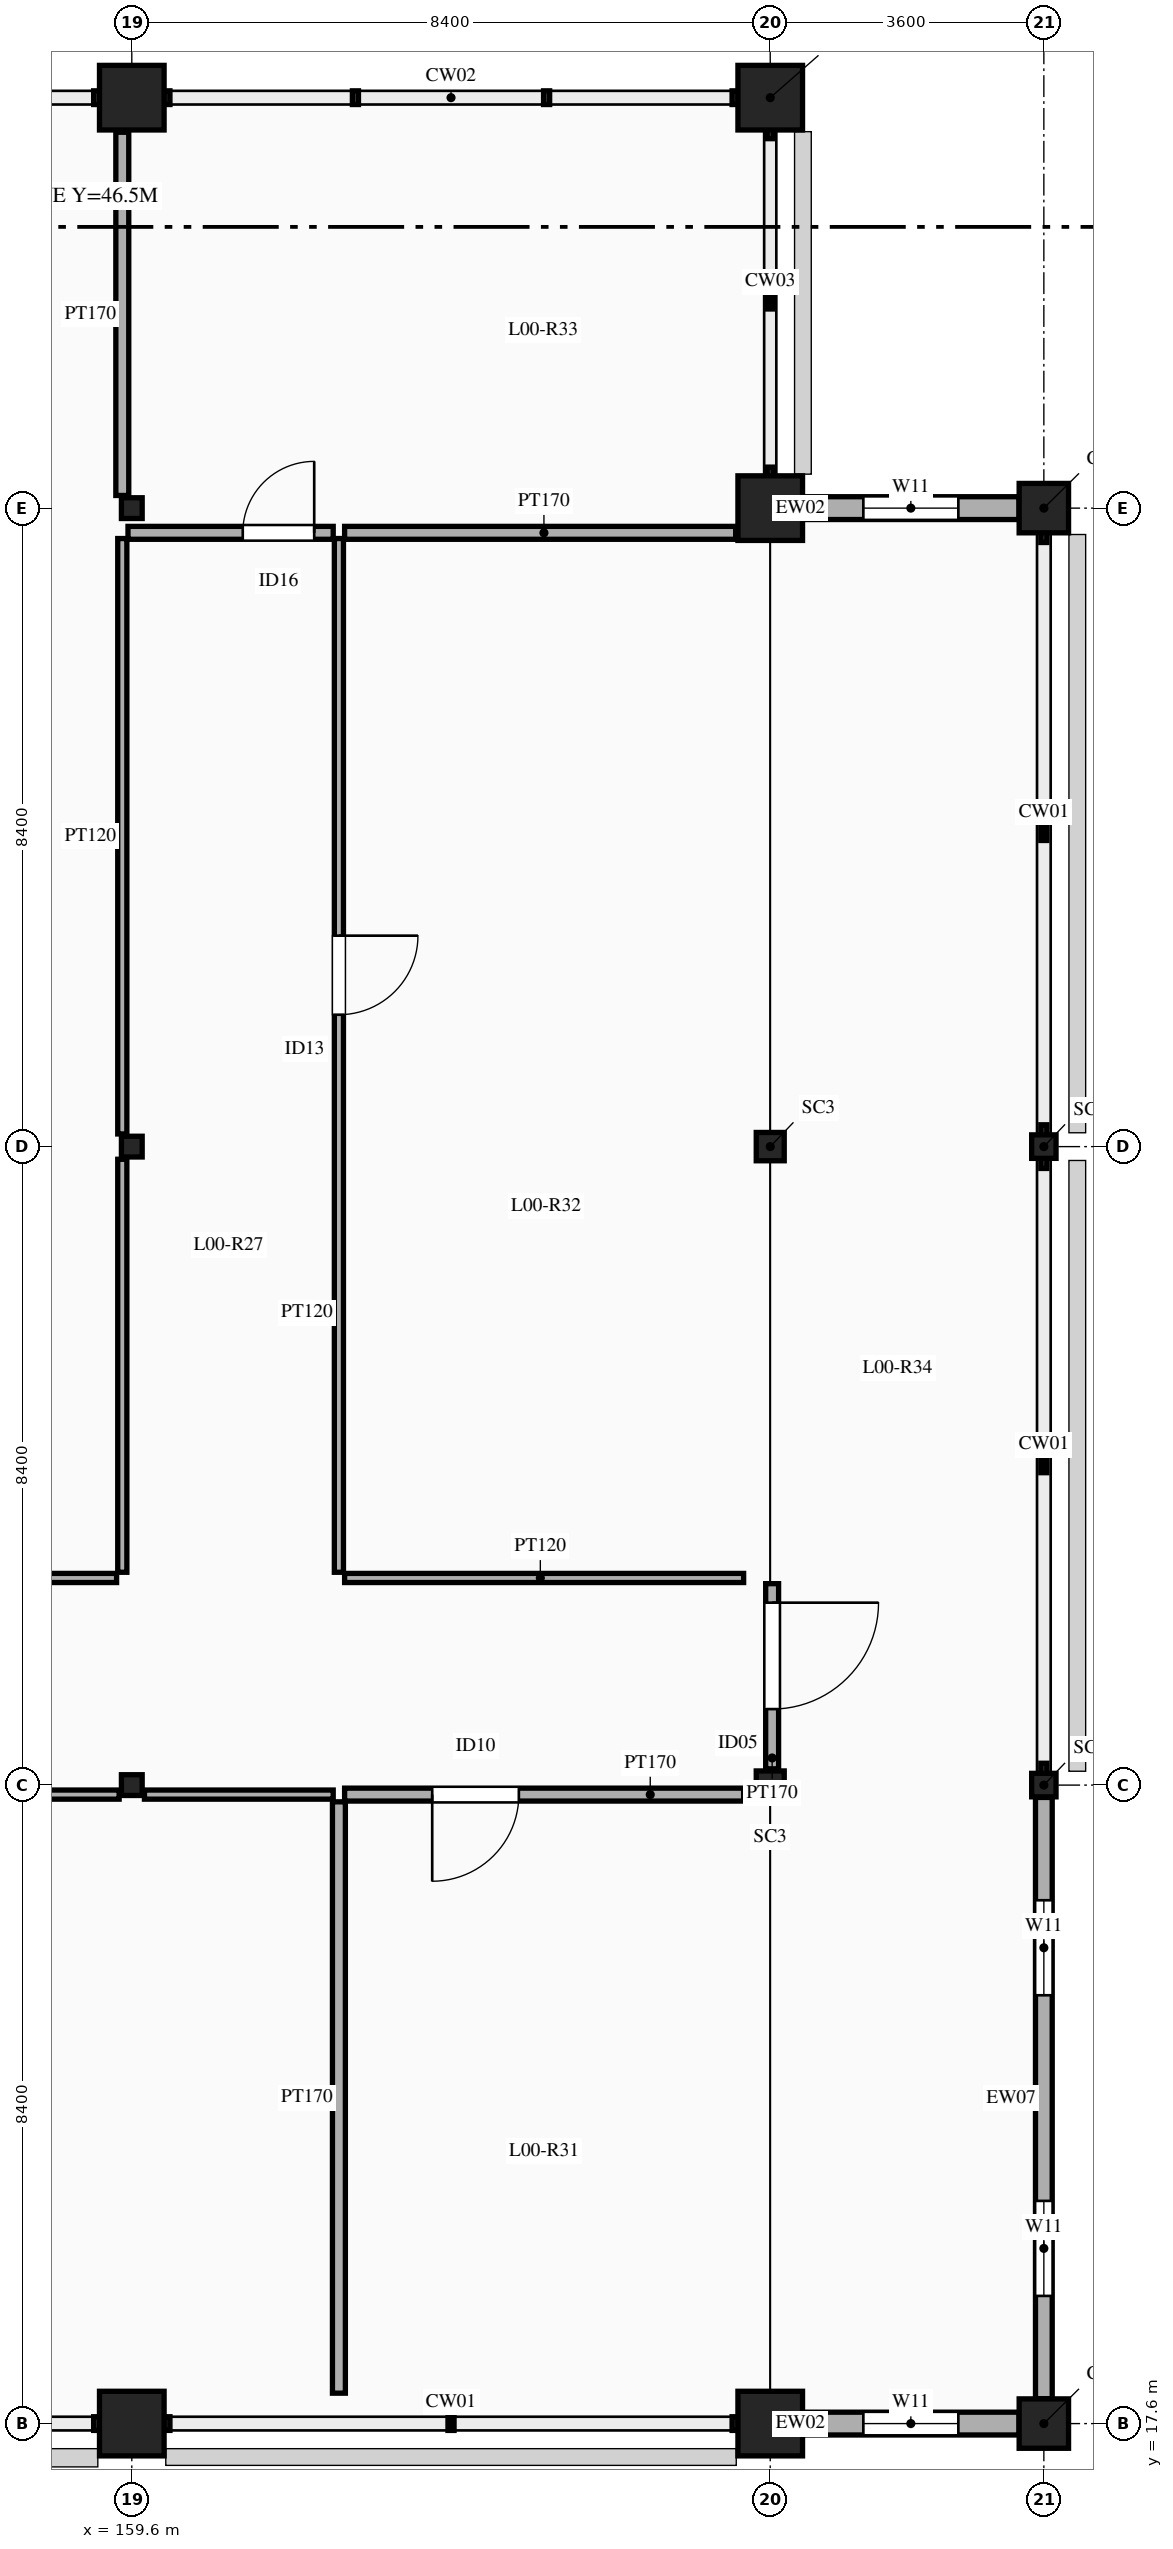
"""IFC4 building model, lengths in metres.
Left out: names, types, materials, properties, quantities, classifications, styles, units other than length and angle.
Written with IfcOpenShell. Run it as: python <this file> out.ifc"""

import sys

from ifc_helpers import new_model, si_unit, direction, frame, frame_2d, origin, origin_2d, place, context, subcontext, project, spatial, rectangle, hollow_circle, i_section, extrude, element, fill, save


model = new_model("IFC4")
c1 = context("Model", 3, precision=1e-05, world=origin(), true_north=direction((0.0, 1.0)))
c2 = subcontext(c1, "Body", "Model", "MODEL_VIEW")
j1 = project(units=[si_unit("LENGTHUNIT", "METRE"), si_unit("PLANEANGLEUNIT", "RADIAN")], contexts=[c1])
p1 = place(None, origin())
s1 = spatial("IfcSite", under=j1, at=p1, CompositionType="ELEMENT")
p2 = place(p1, origin())
s2 = spatial("IfcBuilding", under=s1, at=p2, CompositionType="ELEMENT")
p3 = place(p2, origin())
s3 = spatial("IfcBuildingStorey", under=s2, at=p3, CompositionType="ELEMENT", Elevation=0.0)
for number, where, z_axis, x_axis in (
    (1, (159.6, 17.6, 0.0), (0.0, 0.0, 1.0), (1.0, 0.0, 0.0)),
    (2, (159.6, 48.2, 0.0), (0.0, 0.0, 1.0), (1.0, 0.0, 0.0)),
    (3, (168.0, 17.6, 0.0), (0.0, 0.0, 1.0), (1.0, 0.0, 0.0)),
):
    element("IfcColumn", number, at=place(p3, frame(where, z_axis=z_axis, x_axis=x_axis)), inside=s3, PredefinedType="COLUMN", context=c2, shape_type="SweptSolid", body=[
        extrude(rectangle(XDim=0.85, YDim=0.85, at=origin_2d()), origin(), (0.0, 0.0, 1.0), 5.4),
    ])
for number, where, z_axis, x_axis in (
    (4, (168.0, 26.0, 0.0), (0.0, 0.0, 1.0), (1.0, 0.0, 0.0)),
    (5, (168.0, 34.4, 0.0), (0.0, 0.0, 1.0), (1.0, 0.0, 0.0)),
):
    element("IfcColumn", number, at=place(p3, frame(where, z_axis=z_axis, x_axis=x_axis)), inside=s3, PredefinedType="COLUMN", context=c2, shape_type="SweptSolid", body=[
        extrude(i_section(OverallWidth=0.373, OverallDepth=0.368, WebThickness=0.014, FlangeThickness=0.024, FilletRadius=0.015, at=origin_2d()), origin(), (0.0, 0.0, 1.0), 5.4),
    ])
for number, where, z_axis, x_axis in (
    (6, (168.0, 42.8, 0.0), (0.0, 0.0, 1.0), (1.0, 0.0, 0.0)),
    (7, (168.0, 48.2, 0.0), (0.0, 0.0, 1.0), (1.0, 0.0, 0.0)),
):
    element("IfcColumn", number, at=place(p3, frame(where, z_axis=z_axis, x_axis=x_axis)), inside=s3, PredefinedType="COLUMN", context=c2, shape_type="SweptSolid", body=[
        extrude(rectangle(XDim=0.85, YDim=0.85, at=origin_2d()), origin(), (0.0, 0.0, 1.0), 5.4),
    ])
p4 = place(p3, frame((171.6, 17.6, 0.0), z_axis=(0.0, 0.0, 1.0), x_axis=(1.0, 0.0, 0.0)))
e8 = element("IfcColumn", 8, at=p4, inside=s3, PredefinedType="COLUMN", context=c2, shape_type="SweptSolid", body=[
    extrude(rectangle(XDim=0.65, YDim=0.65, at=origin_2d()), origin(), (0.0, 0.0, 1.0), 5.4),
])
for number, where, z_axis, x_axis in (
    (9, (171.6, 26.0, 0.0), (0.0, 0.0, 1.0), (1.0, 0.0, 0.0)),
    (10, (171.6, 34.4, 0.0), (0.0, 0.0, 1.0), (1.0, 0.0, 0.0)),
):
    element("IfcColumn", number, at=place(p3, frame(where, z_axis=z_axis, x_axis=x_axis)), inside=s3, PredefinedType="COLUMN", context=c2, shape_type="SweptSolid", body=[
        extrude(i_section(OverallWidth=0.309, OverallDepth=0.321, WebThickness=0.014, FlangeThickness=0.022, FilletRadius=0.015, at=origin_2d()), origin(), (0.0, 0.0, 1.0), 5.4),
    ])
p5 = place(p3, frame((171.6, 42.8, 0.0), z_axis=(0.0, 0.0, 1.0), x_axis=(1.0, 0.0, 0.0)))
e11 = element("IfcColumn", 11, at=p5, inside=s3, PredefinedType="COLUMN", context=c2, shape_type="SweptSolid", body=[
    extrude(rectangle(XDim=0.65, YDim=0.65, at=origin_2d()), origin(), (0.0, 0.0, 1.0), 5.4),
])
for number, where, z_axis, x_axis in (
    (12, (159.6, 26.0, 0.0), (0.0, 0.0, 1.0), (1.0, 0.0, 0.0)),
    (13, (159.6, 34.4, 0.0), (0.0, 0.0, 1.0), (1.0, 0.0, 0.0)),
    (14, (159.6, 42.8, 0.0), (0.0, 0.0, 1.0), (1.0, 0.0, 0.0)),
):
    element("IfcColumn", number, at=place(p3, frame(where, z_axis=z_axis, x_axis=x_axis)), inside=s3, PredefinedType="COLUMN", context=c2, shape_type="SweptSolid", body=[
        extrude(hollow_circle(Radius=0.136, WallThickness=0.01, at=origin_2d()), origin(), (0.0, 0.0, 1.0), 5.2),
    ])
p6 = place(p3, frame((168.427, 17.6, 0.0), z_axis=(0.0, 0.0, 1.0), x_axis=(1.0, 0.0, 0.0)))
e15 = element("IfcWall", 15, at=p6, inside=s3, PredefinedType="SOLIDWALL", context=c2, shape_type="SweptSolid", body=[
    extrude(rectangle(XDim=2.846, YDim=0.3, at=frame_2d((1.423, 0.0))), origin(), (0.0, 0.0, 1.0), 4.45),
])
p7 = place(p6, frame((0.798, 0.0, 0.9)))
e16 = element("IfcOpeningElement", 16, at=p7, cuts=e15, PredefinedType="OPENING", context=c2, shape_type="SweptSolid", body=[
    extrude(rectangle(XDim=1.25, YDim=1.8, at=frame_2d((0.625, 0.9))), frame((0.0, 0.16, 0.0), z_axis=(0.0, -1.0, 0.0), x_axis=(1.0, 0.0, 0.0)), (0.0, 0.0, 1.0), 0.32),
])
p8 = place(p3, frame((168.427, 42.8, 0.0), z_axis=(0.0, 0.0, 1.0), x_axis=(1.0, 0.0, 0.0)))
e17 = element("IfcWall", 17, at=p8, inside=s3, PredefinedType="SOLIDWALL", context=c2, shape_type="SweptSolid", body=[
    extrude(rectangle(XDim=2.846, YDim=0.3, at=frame_2d((1.423, 0.0))), origin(), (0.0, 0.0, 1.0), 4.45),
])
p9 = place(p8, frame((0.798, 0.0, 0.9)))
e18 = element("IfcOpeningElement", 18, at=p9, cuts=e17, PredefinedType="OPENING", context=c2, shape_type="SweptSolid", body=[
    extrude(rectangle(XDim=1.25, YDim=1.8, at=frame_2d((0.625, 0.9))), frame((0.0, 0.16, 0.0), z_axis=(0.0, -1.0, 0.0), x_axis=(1.0, 0.0, 0.0)), (0.0, 0.0, 1.0), 0.32),
])
p10 = place(p3, frame((171.6, 17.927, 0.0), z_axis=(0.0, 0.0, 1.0), x_axis=(0.0, 1.0, 0.0)))
e19 = element("IfcWall", 19, at=p10, inside=s3, PredefinedType="USERDEFINED", context=c2, shape_type="SweptSolid", body=[
    extrude(rectangle(XDim=7.911, YDim=0.22, at=frame_2d((3.955, 0.0))), origin(), (0.0, 0.0, 1.0), 4.45),
])
p11 = place(p10, frame((1.353, 0.0, 0.9)))
e20 = element("IfcOpeningElement", 20, at=p11, cuts=e19, PredefinedType="OPENING", context=c2, shape_type="SweptSolid", body=[
    extrude(rectangle(XDim=1.25, YDim=1.8, at=frame_2d((0.625, 0.9))), frame((0.0, 0.12, 0.0), z_axis=(0.0, -1.0, 0.0), x_axis=(1.0, 0.0, 0.0)), (0.0, 0.0, 1.0), 0.24),
])
p12 = place(p10, frame((5.308, 0.0, 0.9)))
e21 = element("IfcOpeningElement", 21, at=p12, cuts=e19, PredefinedType="OPENING", context=c2, shape_type="SweptSolid", body=[
    extrude(rectangle(XDim=1.25, YDim=1.8, at=frame_2d((0.625, 0.9))), frame((0.0, 0.12, 0.0), z_axis=(0.0, -1.0, 0.0), x_axis=(1.0, 0.0, 0.0)), (0.0, 0.0, 1.0), 0.24),
])
p13 = place(p3, frame((151.366, 25.875, 0.0), z_axis=(0.0, 0.0, 1.0), x_axis=(1.0, 0.0, 0.0)))
e22 = element("IfcWall", 22, at=p13, inside=s3, PredefinedType="PARTITIONING", context=c2, shape_type="SweptSolid", body=[
    extrude(rectangle(XDim=8.067, YDim=0.12, at=frame_2d((4.034, 0.0))), origin(), (0.0, 0.0, 1.0), 4.35),
])
p14 = place(p3, frame((159.767, 25.875, 0.0), z_axis=(0.0, 0.0, 1.0), x_axis=(1.0, 0.0, 0.0)))
e23 = element("IfcWall", 23, at=p14, inside=s3, PredefinedType="PARTITIONING", context=c2, shape_type="SweptSolid", body=[
    extrude(rectangle(XDim=2.483, YDim=0.12, at=frame_2d((1.242, 0.0))), origin(), (0.0, 0.0, 1.0), 4.35),
])
p15 = place(p3, frame((143.75, 28.725, 0.0), z_axis=(0.0, 0.0, 1.0), x_axis=(1.0, 0.0, 0.0)))
e24 = element("IfcWall", 24, at=p15, inside=s3, PredefinedType="PARTITIONING", context=c2, shape_type="SweptSolid", body=[
    extrude(rectangle(XDim=15.65, YDim=0.12, at=frame_2d((7.825, 0.0))), origin(), (0.0, 0.0, 1.0), 4.35),
])
p16 = place(p15, frame((9.217, 0.0, 0.0)))
e25 = element("IfcOpeningElement", 25, at=p16, cuts=e24, PredefinedType="OPENING", context=c2, shape_type="SweptSolid", body=[
    extrude(rectangle(XDim=1.7, YDim=2.4, at=frame_2d((0.85, 1.2))), frame((0.0, 0.07, 0.0), z_axis=(0.0, -1.0, 0.0), x_axis=(1.0, 0.0, 0.0)), (0.0, 0.0, 1.0), 0.14),
])
p17 = place(p3, frame((162.4, 25.875, 0.0), z_axis=(0.0, 0.0, 1.0), x_axis=(1.0, 0.0, 0.0)))
e26 = element("IfcWall", 26, at=p17, inside=s3, PredefinedType="PARTITIONING", context=c2, shape_type="SweptSolid", body=[
    extrude(rectangle(XDim=5.25, YDim=0.17, at=frame_2d((2.625, 0.0))), origin(), (0.0, 0.0, 1.0), 4.35),
])
p18 = place(p17, frame((1.153, 0.0, 0.0)))
e27 = element("IfcOpeningElement", 27, at=p18, cuts=e26, PredefinedType="OPENING", context=c2, shape_type="SweptSolid", body=[
    extrude(rectangle(XDim=1.14, YDim=2.22, at=frame_2d((0.57, 1.11))), frame((0.0, 0.095, 0.0), z_axis=(0.0, -1.0, 0.0), x_axis=(1.0, 0.0, 0.0)), (0.0, 0.0, 1.0), 0.19),
])
p19 = place(p3, frame((162.4, 28.725, 0.0), z_axis=(0.0, 0.0, 1.0), x_axis=(1.0, 0.0, 0.0)))
e28 = element("IfcWall", 28, at=p19, inside=s3, PredefinedType="PARTITIONING", context=c2, shape_type="SweptSolid", body=[
    extrude(rectangle(XDim=5.25, YDim=0.12, at=frame_2d((2.625, 0.0))), origin(), (0.0, 0.0, 1.0), 4.35),
])
p20 = place(p3, frame((168.025, 26.214, 0.0), z_axis=(0.0, 0.0, 1.0), x_axis=(0.0, 1.0, 0.0)))
e29 = element("IfcWall", 29, at=p20, inside=s3, PredefinedType="PARTITIONING", context=c2, shape_type="SweptSolid", body=[
    extrude(rectangle(XDim=2.436, YDim=0.17, at=frame_2d((1.218, 0.0))), origin(), (0.0, 0.0, 1.0), 4.35),
])
p21 = place(p20, frame((0.786, 0.0, 0.0)))
e30 = element("IfcOpeningElement", 30, at=p21, cuts=e29, PredefinedType="OPENING", context=c2, shape_type="SweptSolid", body=[
    extrude(rectangle(XDim=1.4, YDim=2.25, at=frame_2d((0.7, 1.125))), frame((0.0, 0.095, 0.0), z_axis=(0.0, -1.0, 0.0), x_axis=(1.0, 0.0, 0.0)), (0.0, 0.0, 1.0), 0.19),
])
p22 = place(p3, frame((159.475, 28.8, 0.0), z_axis=(0.0, 0.0, 1.0), x_axis=(0.0, 1.0, 0.0)))
e31 = element("IfcWall", 31, at=p22, inside=s3, PredefinedType="PARTITIONING", context=c2, shape_type="SweptSolid", body=[
    extrude(rectangle(XDim=5.433, YDim=0.12, at=frame_2d((2.717, 0.0))), origin(), (0.0, 0.0, 1.0), 4.35),
])
p23 = place(p3, frame((159.475, 34.566, 0.0), z_axis=(0.0, 0.0, 1.0), x_axis=(0.0, 1.0, 0.0)))
e32 = element("IfcWall", 32, at=p23, inside=s3, PredefinedType="PARTITIONING", context=c2, shape_type="SweptSolid", body=[
    extrude(rectangle(XDim=7.833, YDim=0.12, at=frame_2d((3.917, 0.0))), origin(), (0.0, 0.0, 1.0), 4.35),
])
p24 = place(p3, frame((162.325, 28.8, 0.0), z_axis=(0.0, 0.0, 1.0), x_axis=(0.0, 1.0, 0.0)))
e33 = element("IfcWall", 33, at=p24, inside=s3, PredefinedType="PARTITIONING", context=c2, shape_type="SweptSolid", body=[
    extrude(rectangle(XDim=13.6, YDim=0.12, at=frame_2d((6.8, 0.0))), origin(), (0.0, 0.0, 1.0), 4.35),
])
p25 = place(p24, frame((7.335, 0.0, 0.0)))
e34 = element("IfcOpeningElement", 34, at=p25, cuts=e33, PredefinedType="OPENING", context=c2, shape_type="SweptSolid", body=[
    extrude(rectangle(XDim=1.04, YDim=2.15, at=frame_2d((0.52, 1.075))), frame((0.0, 0.07, 0.0), z_axis=(0.0, -1.0, 0.0), x_axis=(1.0, 0.0, 0.0)), (0.0, 0.0, 1.0), 0.14),
])
p26 = place(p3, frame((159.55, 42.475, 0.0), z_axis=(0.0, 0.0, 1.0), x_axis=(1.0, 0.0, 0.0)))
e35 = element("IfcWall", 35, at=p26, inside=s3, PredefinedType="PARTITIONING", context=c2, shape_type="SweptSolid", body=[
    extrude(rectangle(XDim=2.7, YDim=0.17, at=frame_2d((1.35, 0.0))), origin(), (0.0, 0.0, 1.0), 4.35),
])
p27 = place(p26, frame((1.51, 0.0, 0.0)))
e36 = element("IfcOpeningElement", 36, at=p27, cuts=e35, PredefinedType="OPENING", context=c2, shape_type="SweptSolid", body=[
    extrude(rectangle(XDim=0.94, YDim=2.1, at=frame_2d((0.47, 1.05))), frame((0.0, 0.095, 0.0), z_axis=(0.0, -1.0, 0.0), x_axis=(1.0, 0.0, 0.0)), (0.0, 0.0, 1.0), 0.19),
])
p28 = place(p3, frame((162.325, 18.0, 0.0), z_axis=(0.0, 0.0, 1.0), x_axis=(0.0, 1.0, 0.0)))
e37 = element("IfcWall", 37, at=p28, inside=s3, PredefinedType="PARTITIONING", context=c2, shape_type="SweptSolid", body=[
    extrude(rectangle(XDim=7.78, YDim=0.17, at=frame_2d((3.89, 0.0))), origin(), (0.0, 0.0, 1.0), 4.35),
])
p29 = place(p3, frame((159.475, 42.967, 0.0), z_axis=(0.0, 0.0, 1.0), x_axis=(0.0, 1.0, 0.0)))
e38 = element("IfcWall", 38, at=p29, inside=s3, PredefinedType="PARTITIONING", context=c2, shape_type="SweptSolid", body=[
    extrude(rectangle(XDim=4.779, YDim=0.17, at=frame_2d((2.389, 0.0))), origin(), (0.0, 0.0, 1.0), 4.35),
])
p30 = place(p3, frame((162.4, 42.475, 0.0), z_axis=(0.0, 0.0, 1.0), x_axis=(1.0, 0.0, 0.0)))
e39 = element("IfcWall", 39, at=p30, inside=s3, PredefinedType="PARTITIONING", context=c2, shape_type="SweptSolid", body=[
    extrude(rectangle(XDim=5.145, YDim=0.17, at=frame_2d((2.573, 0.0))), origin(), (0.0, 0.0, 1.0), 4.35),
])
p31 = place(p7, origin())
e40 = element("IfcWindow", 40, at=p31, inside=s3, PartitioningType="DOUBLE_PANEL_HORIZONTAL", PredefinedType="WINDOW", context=c2, shape_type="SweptSolid", body=[
    extrude(rectangle(XDim=1.25, YDim=1.8, at=frame_2d((0.625, 0.9))), frame((0.0, 0.03, 0.0), z_axis=(0.0, -1.0, 0.0), x_axis=(1.0, 0.0, 0.0)), (0.0, 0.0, 1.0), 0.06),
])
fill(e16, e40)
p32 = place(p9, origin())
e41 = element("IfcWindow", 41, at=p32, inside=s3, PartitioningType="DOUBLE_PANEL_HORIZONTAL", PredefinedType="WINDOW", context=c2, shape_type="SweptSolid", body=[
    extrude(rectangle(XDim=1.25, YDim=1.8, at=frame_2d((0.625, 0.9))), frame((0.0, 0.03, 0.0), z_axis=(0.0, -1.0, 0.0), x_axis=(1.0, 0.0, 0.0)), (0.0, 0.0, 1.0), 0.06),
])
fill(e18, e41)
p33 = place(p11, origin())
e42 = element("IfcWindow", 42, at=p33, inside=s3, PartitioningType="DOUBLE_PANEL_HORIZONTAL", PredefinedType="WINDOW", context=c2, shape_type="SweptSolid", body=[
    extrude(rectangle(XDim=1.25, YDim=1.8, at=frame_2d((0.625, 0.9))), frame((0.0, 0.03, 0.0), z_axis=(0.0, -1.0, 0.0), x_axis=(1.0, 0.0, 0.0)), (0.0, 0.0, 1.0), 0.06),
])
fill(e20, e42)
p34 = place(p12, origin())
e43 = element("IfcWindow", 43, at=p34, inside=s3, PartitioningType="DOUBLE_PANEL_HORIZONTAL", PredefinedType="WINDOW", context=c2, shape_type="SweptSolid", body=[
    extrude(rectangle(XDim=1.25, YDim=1.8, at=frame_2d((0.625, 0.9))), frame((0.0, 0.03, 0.0), z_axis=(0.0, -1.0, 0.0), x_axis=(1.0, 0.0, 0.0)), (0.0, 0.0, 1.0), 0.06),
])
fill(e21, e43)
p35 = place(p18, frame((1.14, 0.0, 0.0), z_axis=(0.0, 0.0, 1.0), x_axis=(-1.0, 0.0, 0.0)))
e44 = element("IfcDoor", 44, at=p35, inside=s3, OperationType="SINGLE_SWING_RIGHT", PredefinedType="DOOR", context=c2, shape_type="SweptSolid", body=[
    extrude(rectangle(XDim=1.14, YDim=2.22, at=frame_2d((0.57, 1.11))), frame((0.0, 0.025, 0.0), z_axis=(0.0, -1.0, 0.0), x_axis=(1.0, 0.0, 0.0)), (0.0, 0.0, 1.0), 0.05),
])
fill(e27, e44)
p36 = place(p25, frame((1.04, 0.0, 0.0), z_axis=(0.0, 0.0, 1.0), x_axis=(-1.0, 0.0, 0.0)))
e45 = element("IfcDoor", 45, at=p36, inside=s3, OperationType="SINGLE_SWING_LEFT", PredefinedType="DOOR", context=c2, shape_type="SweptSolid", body=[
    extrude(rectangle(XDim=1.04, YDim=2.15, at=frame_2d((0.52, 1.075))), frame((0.0, 0.025, 0.0), z_axis=(0.0, -1.0, 0.0), x_axis=(1.0, 0.0, 0.0)), (0.0, 0.0, 1.0), 0.05),
])
fill(e34, e45)
p37 = place(p27, origin())
e46 = element("IfcDoor", 46, at=p37, inside=s3, OperationType="SINGLE_SWING_RIGHT", PredefinedType="DOOR", context=c2, shape_type="SweptSolid", body=[
    extrude(rectangle(XDim=0.94, YDim=2.1, at=frame_2d((0.47, 1.05))), frame((0.0, 0.025, 0.0), z_axis=(0.0, -1.0, 0.0), x_axis=(1.0, 0.0, 0.0)), (0.0, 0.0, 1.0), 0.05),
])
fill(e36, e46)
p38 = place(p21, frame((1.4, 0.0, 0.0), z_axis=(0.0, 0.0, 1.0), x_axis=(-1.0, 0.0, 0.0)))
e47 = element("IfcDoor", 47, at=p38, inside=s3, OperationType="SINGLE_SWING_LEFT", PredefinedType="DOOR", context=c2, shape_type="SweptSolid", body=[
    extrude(rectangle(XDim=1.4, YDim=2.25, at=frame_2d((0.7, 1.125))), frame((0.0, 0.025, 0.0), z_axis=(0.0, -1.0, 0.0), x_axis=(1.0, 0.0, 0.0)), (0.0, 0.0, 1.0), 0.05),
])
fill(e30, e47)
save(model, sys.argv[1])
